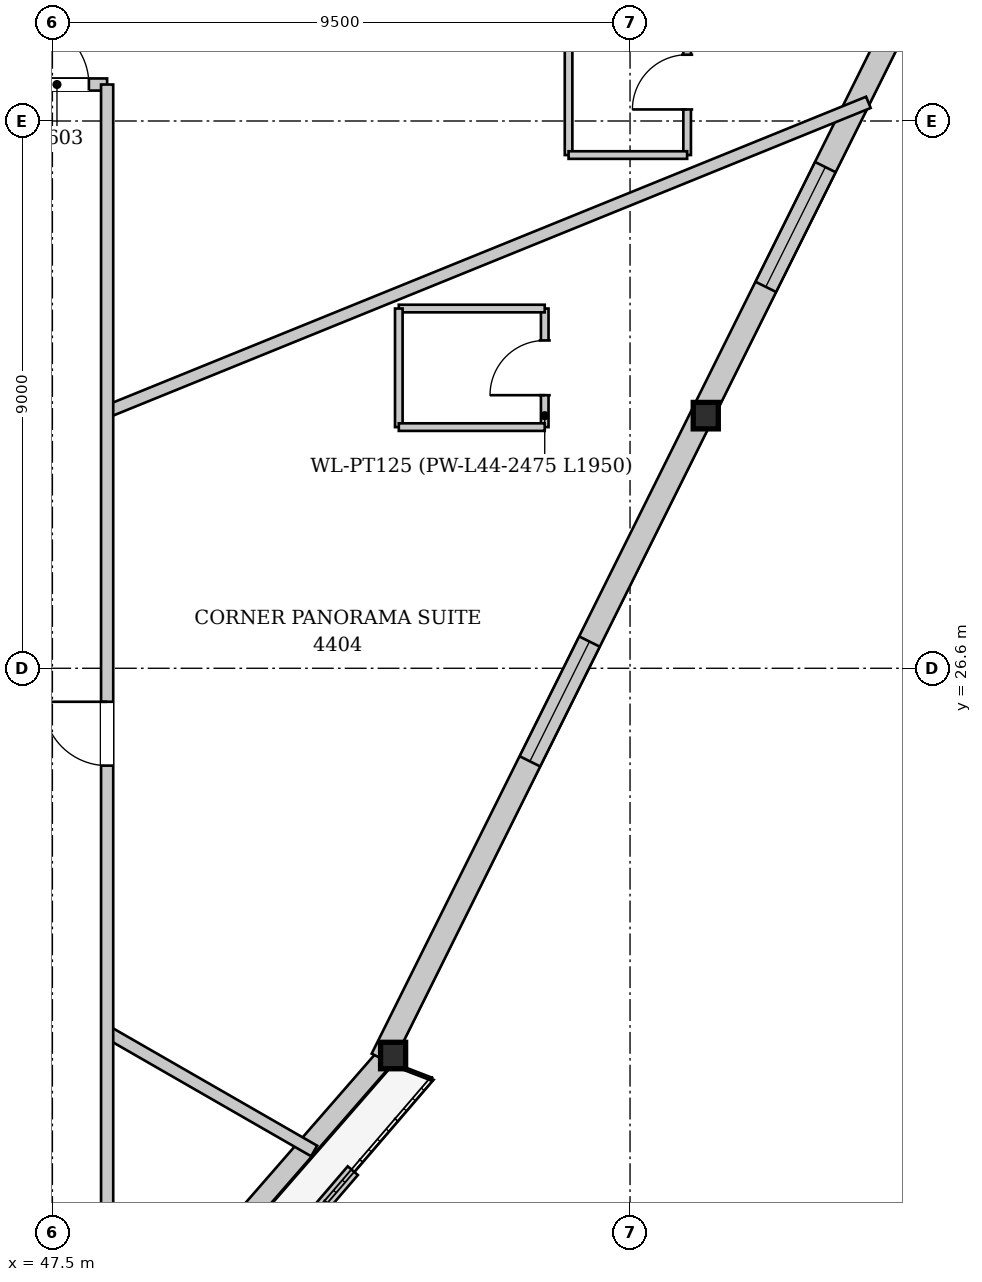
"""IFC4 building model, lengths in metres.
Left out: names, types, materials, properties, quantities, classifications, styles, units other than length and angle.
Written with IfcOpenShell. Run it as: python <this file> out.ifc"""

import sys

from ifc_helpers import new_model, si_unit, direction, frame, frame_2d, origin, origin_2d, place, context, subcontext, project, spatial, rectangle, i_section, extrude, source, transform, mapped, element, fill, save


model = new_model("IFC4")
c1 = context("Model", 3, precision=1e-05, world=origin(), true_north=direction((0.0, 1.0)))
c2 = subcontext(c1, "Body", "Model", "MODEL_VIEW")
j1 = project(units=[si_unit("LENGTHUNIT", "METRE"), si_unit("PLANEANGLEUNIT", "RADIAN")], contexts=[c1])
p1 = place(None, origin())
s1 = spatial("IfcSite", under=j1, at=p1, CompositionType="ELEMENT")
p2 = place(p1, origin())
s2 = spatial("IfcBuilding", under=s1, at=p2, CompositionType="ELEMENT")
p3 = place(p2, frame((0.0, 0.0, 167.9)))
s3 = spatial("IfcBuildingStorey", under=s2, at=p3, CompositionType="ELEMENT", Elevation=167.9)
m1 = source(origin(), c2, "Body", "SweptSolid", [
    extrude(i_section(OverallWidth=0.412, OverallDepth=0.435, WebThickness=0.031, FlangeThickness=0.05, at=origin_2d()), origin(), (0.0, 0.0, 1.0), 3.396),
])
p4 = place(p3, frame((53.091, 20.093, 0.0), z_axis=(0.00718813238, 0.081657183832, 0.996634554429), x_axis=(-0.996147893688, 0.087689075149, 0.0)))
e1 = element("IfcColumn", 1, at=p4, inside=s3, PredefinedType="COLUMN", context=c2, shape_type="MappedRepresentation", body=[
    mapped(m1, transform((0.0, 0.0, 0.0), x_axis=(1.0, 0.0, 0.0), y_axis=(0.0, 1.0, 0.0), z_axis=(0.0, 0.0, 1.0), scale=1.0)),
])
m2 = source(origin(), c2, "Body", "SweptSolid", [
    extrude(i_section(OverallWidth=0.412, OverallDepth=0.435, WebThickness=0.031, FlangeThickness=0.05, at=origin_2d()), origin(), (0.0, 0.0, 1.0), 3.404),
])
p5 = place(p3, frame((58.309, 30.587, 0.0), z_axis=(-0.037225683015, 0.098120875462, 0.994478025058), x_axis=(-0.934974079161, -0.354716043191, 0.0)))
e2 = element("IfcColumn", 2, at=p5, inside=s3, PredefinedType="COLUMN", context=c2, shape_type="MappedRepresentation", body=[
    mapped(m2, transform((0.0, 0.0, 0.0), x_axis=(1.0, 0.0, 0.0), y_axis=(0.0, 1.0, 0.0), z_axis=(0.0, 0.0, 1.0), scale=1.0)),
])
p6 = place(p3, frame((52.97, 20.198, 0.0), z_axis=(0.0, 0.0, 1.0), x_axis=(-0.656914851648, -0.753964772177, 0.0)))
e3 = element("IfcWall", 3, at=p6, inside=s3, PredefinedType="SOLIDWALL", context=c2, shape_type="SweptSolid", body=[
    extrude(rectangle(XDim=23.44, YDim=0.32, at=frame_2d((11.72, 0.0))), origin(), (0.0, 0.0, 1.0), 2.722),
])
p7 = place(p6, frame((6.751, 0.0, 0.0)))
e4 = element("IfcOpeningElement", 4, at=p7, cuts=e3, PredefinedType="OPENING", context=c2, shape_type="SweptSolid", body=[
    extrude(rectangle(XDim=1.5, YDim=2.3, at=frame_2d((0.75, 1.15))), frame((0.0, 0.17, 0.0), z_axis=(0.0, -1.0, 0.0), x_axis=(1.0, 0.0, 0.0)), (0.0, 0.0, 1.0), 0.34),
])
p8 = place(p6, frame((17.646, 0.0, 0.252)))
e5 = element("IfcOpeningElement", 5, at=p8, cuts=e3, PredefinedType="OPENING", context=c2, shape_type="SweptSolid", body=[
    extrude(rectangle(XDim=2.6, YDim=2.35, at=frame_2d((1.3, 1.175))), frame((0.0, 0.17, 0.0), z_axis=(0.0, -1.0, 0.0), x_axis=(1.0, 0.0, 0.0)), (0.0, 0.0, 1.0), 0.34),
])
p9 = place(p3, frame((63.356, 41.167, 0.0), z_axis=(0.0, 0.0, 1.0), x_axis=(-0.44519188478, -0.895435193482, 0.0)))
e6 = element("IfcWall", 6, at=p9, inside=s3, PredefinedType="SOLIDWALL", context=c2, shape_type="SweptSolid", body=[
    extrude(rectangle(XDim=23.441, YDim=0.38, at=frame_2d((11.72, 0.0))), origin(), (0.0, 0.0, 1.0), 2.722),
])
p10 = place(p9, frame((7.063, 0.0, 0.352)))
e7 = element("IfcOpeningElement", 7, at=p10, cuts=e6, PredefinedType="OPENING", context=c2, shape_type="SweptSolid", body=[
    extrude(rectangle(XDim=2.2, YDim=2.25, at=frame_2d((1.1, 1.125))), frame((0.0, 0.2, 0.0), z_axis=(0.0, -1.0, 0.0), x_axis=(1.0, 0.0, 0.0)), (0.0, 0.0, 1.0), 0.4),
])
p11 = place(p9, frame((15.777, 0.0, 0.352)))
e8 = element("IfcOpeningElement", 8, at=p11, cuts=e6, PredefinedType="OPENING", context=c2, shape_type="SweptSolid", body=[
    extrude(rectangle(XDim=2.2, YDim=2.25, at=frame_2d((1.1, 1.125))), frame((0.0, 0.2, 0.0), z_axis=(0.0, -1.0, 0.0), x_axis=(1.0, 0.0, 0.0)), (0.0, 0.0, 1.0), 0.4),
])
p12 = place(p3, frame((38.852, 2.514, 0.0), z_axis=(0.0, 0.0, 1.0), x_axis=(0.651493813463, 0.758653946816, 0.0)))
e9 = element("IfcWall", 9, at=p12, inside=s3, PredefinedType="PARAPET", context=c2, shape_type="SweptSolid", body=[
    extrude(rectangle(XDim=20.858, YDim=0.22, at=frame_2d((10.429, 0.0))), origin(), (0.0, 0.0, 1.0), 0.3),
])
p13 = place(p3, frame((48.4, 20.62, 0.0), z_axis=(0.0, 0.0, 1.0), x_axis=(0.866931821356, -0.498426741979, 0.0)))
e10 = element("IfcWall", 10, at=p13, inside=s3, PredefinedType="PARTITIONING", context=c2, shape_type="SweptSolid", body=[
    extrude(rectangle(XDim=3.927, YDim=0.2, at=frame_2d((1.964, 0.0))), origin(), (0.0, 0.0, 1.0), 3.33),
])
p14 = place(p3, frame((48.4, 30.823, 0.0), z_axis=(0.0, 0.0, 1.0), x_axis=(0.926531533204, 0.376217115477, 0.0)))
e11 = element("IfcWall", 11, at=p14, inside=s3, PredefinedType="PARTITIONING", context=c2, shape_type="SweptSolid", body=[
    extrude(rectangle(XDim=13.513, YDim=0.2, at=frame_2d((6.756, 0.0))), origin(), (0.0, 0.0, 1.0), 3.33),
])
p15 = place(p3, frame((55.597, 30.566, 0.0), z_axis=(0.0, 0.0, 1.0), x_axis=(0.0, 1.0, 0.0)))
e12 = element("IfcWall", 12, at=p15, inside=s3, PredefinedType="PARTITIONING", context=c2, shape_type="SweptSolid", body=[
    extrude(rectangle(XDim=1.95, YDim=0.125, at=frame_2d((0.975, 0.0))), origin(), (0.0, 0.0, 1.0), 3.33),
])
p16 = place(p15, frame((0.525, 0.0, 0.0)))
e13 = element("IfcOpeningElement", 13, at=p16, cuts=e12, PredefinedType="OPENING", context=c2, shape_type="SweptSolid", body=[
    extrude(rectangle(XDim=0.9, YDim=2.1, at=frame_2d((0.45, 1.05))), frame((0.0, 0.073, 0.0), z_axis=(0.0, -1.0, 0.0), x_axis=(1.0, 0.0, 0.0)), (0.0, 0.0, 1.0), 0.145),
])
p17 = place(p3, frame((55.597, 32.516, 0.0), z_axis=(0.0, 0.0, 1.0), x_axis=(-1.0, 0.0, 0.0)))
e14 = element("IfcWall", 14, at=p17, inside=s3, PredefinedType="PARTITIONING", context=c2, shape_type="SweptSolid", body=[
    extrude(rectangle(XDim=2.4, YDim=0.125, at=frame_2d((1.2, 0.0))), origin(), (0.0, 0.0, 1.0), 3.33),
])
p18 = place(p3, frame((53.197, 32.516, 0.0), z_axis=(0.0, 0.0, 1.0), x_axis=(0.0, -1.0, 0.0)))
e15 = element("IfcWall", 15, at=p18, inside=s3, PredefinedType="PARTITIONING", context=c2, shape_type="SweptSolid", body=[
    extrude(rectangle(XDim=1.95, YDim=0.125, at=frame_2d((0.975, 0.0))), origin(), (0.0, 0.0, 1.0), 3.33),
])
p19 = place(p3, frame((53.197, 30.566, 0.0), z_axis=(0.0, 0.0, 1.0), x_axis=(1.0, 0.0, 0.0)))
e16 = element("IfcWall", 16, at=p19, inside=s3, PredefinedType="PARTITIONING", context=c2, shape_type="SweptSolid", body=[
    extrude(rectangle(XDim=2.4, YDim=0.125, at=frame_2d((1.2, 0.0))), origin(), (0.0, 0.0, 1.0), 3.33),
])
p20 = place(p3, frame((57.939, 35.04, 0.0), z_axis=(0.0, 0.0, 1.0), x_axis=(0.0, 1.0, 0.0)))
e17 = element("IfcWall", 17, at=p20, inside=s3, PredefinedType="PARTITIONING", context=c2, shape_type="SweptSolid", body=[
    extrude(rectangle(XDim=2.4, YDim=0.125, at=frame_2d((1.2, 0.0))), origin(), (0.0, 0.0, 1.0), 3.33),
])
p21 = place(p20, frame((0.75, 0.0, 0.0)))
e18 = element("IfcOpeningElement", 18, at=p21, cuts=e17, PredefinedType="OPENING", context=c2, shape_type="SweptSolid", body=[
    extrude(rectangle(XDim=0.9, YDim=2.1, at=frame_2d((0.45, 1.05))), frame((0.0, 0.073, 0.0), z_axis=(0.0, -1.0, 0.0), x_axis=(1.0, 0.0, 0.0)), (0.0, 0.0, 1.0), 0.145),
])
p22 = place(p3, frame((55.989, 37.44, 0.0), z_axis=(0.0, 0.0, 1.0), x_axis=(0.0, -1.0, 0.0)))
e19 = element("IfcWall", 19, at=p22, inside=s3, PredefinedType="PARTITIONING", context=c2, shape_type="SweptSolid", body=[
    extrude(rectangle(XDim=2.4, YDim=0.125, at=frame_2d((1.2, 0.0))), origin(), (0.0, 0.0, 1.0), 3.33),
])
p23 = place(p3, frame((55.989, 35.04, 0.0), z_axis=(0.0, 0.0, 1.0), x_axis=(1.0, 0.0, 0.0)))
e20 = element("IfcWall", 20, at=p23, inside=s3, PredefinedType="PARTITIONING", context=c2, shape_type="SweptSolid", body=[
    extrude(rectangle(XDim=1.95, YDim=0.125, at=frame_2d((0.975, 0.0))), origin(), (0.0, 0.0, 1.0), 3.33),
])
p24 = place(p3, frame((43.4, 36.2, 0.0), z_axis=(0.0, 0.0, 1.0), x_axis=(1.0, 0.0, 0.0)))
e21 = element("IfcWall", 21, at=p24, inside=s3, PredefinedType="PARTITIONING", context=c2, shape_type="SweptSolid", body=[
    extrude(rectangle(XDim=5.0, YDim=0.2, at=frame_2d((2.5, 0.0))), origin(), (0.0, 0.0, 1.0), 3.33),
])
p25 = place(p24, frame((3.65, 0.0, 0.0)))
e22 = element("IfcOpeningElement", 22, at=p25, cuts=e21, PredefinedType="OPENING", context=c2, shape_type="SweptSolid", body=[
    extrude(rectangle(XDim=1.05, YDim=2.2, at=frame_2d((0.525, 1.1))), frame((0.0, 0.11, 0.0), z_axis=(0.0, -1.0, 0.0), x_axis=(1.0, 0.0, 0.0)), (0.0, 0.0, 1.0), 0.22),
])
p26 = place(p3, frame((48.4, 17.0, 0.0), z_axis=(0.0, 0.0, 1.0), x_axis=(0.0, 1.0, 0.0)))
e23 = element("IfcWall", 23, at=p26, inside=s3, PredefinedType="PARTITIONING", context=c2, shape_type="SweptSolid", body=[
    extrude(rectangle(XDim=19.2, YDim=0.2, at=frame_2d((9.6, 0.0))), origin(), (0.0, 0.0, 1.0), 3.33),
])
p27 = place(p26, frame((7.999, 0.0, 0.0)))
e24 = element("IfcOpeningElement", 24, at=p27, cuts=e23, PredefinedType="OPENING", context=c2, shape_type="SweptSolid", body=[
    extrude(rectangle(XDim=1.05, YDim=2.2, at=frame_2d((0.525, 1.1))), frame((0.0, 0.11, 0.0), z_axis=(0.0, -1.0, 0.0), x_axis=(1.0, 0.0, 0.0)), (0.0, 0.0, 1.0), 0.22),
])
m3 = source(origin(), c2, "Body", "SweptSolid", [
    extrude(rectangle(XDim=2.2, YDim=2.25, at=frame_2d((1.1, 1.125))), frame((0.0, 0.03, 0.0), z_axis=(0.0, -1.0, 0.0), x_axis=(1.0, 0.0, 0.0)), (0.0, 0.0, 1.0), 0.06),
])
p28 = place(p10, origin())
e25 = element("IfcWindow", 25, at=p28, inside=s3, PartitioningType="SINGLE_PANEL", PredefinedType="WINDOW", context=c2, shape_type="MappedRepresentation", body=[
    mapped(m3, transform((0.0, 0.0, 0.0), x_axis=(1.0, 0.0, 0.0), y_axis=(0.0, 1.0, 0.0), z_axis=(0.0, 0.0, 1.0), scale=1.0)),
])
fill(e7, e25)
p29 = place(p11, origin())
e26 = element("IfcWindow", 26, at=p29, inside=s3, PartitioningType="SINGLE_PANEL", PredefinedType="WINDOW", context=c2, shape_type="MappedRepresentation", body=[
    mapped(m3, transform((0.0, 0.0, 0.0), x_axis=(1.0, 0.0, 0.0), y_axis=(0.0, 1.0, 0.0), z_axis=(0.0, 0.0, 1.0), scale=1.0)),
])
fill(e8, e26)
m4 = source(origin(), c2, "Body", "SweptSolid", [
    extrude(rectangle(XDim=0.9, YDim=2.1, at=frame_2d((0.45, 1.05))), frame((0.0, 0.025, 0.0), z_axis=(0.0, -1.0, 0.0), x_axis=(1.0, 0.0, 0.0)), (0.0, 0.0, 1.0), 0.05),
])
p30 = place(p16, origin())
e27 = element("IfcDoor", 27, at=p30, inside=s3, OperationType="SINGLE_SWING_LEFT", PredefinedType="DOOR", context=c2, shape_type="MappedRepresentation", body=[
    mapped(m4, transform((0.0, 0.0, 0.0), x_axis=(1.0, 0.0, 0.0), y_axis=(0.0, 1.0, 0.0), z_axis=(0.0, 0.0, 1.0), scale=1.0)),
])
fill(e13, e27)
p31 = place(p21, origin())
e28 = element("IfcDoor", 28, at=p31, inside=s3, OperationType="SINGLE_SWING_LEFT", PredefinedType="DOOR", context=c2, shape_type="MappedRepresentation", body=[
    mapped(m4, transform((0.0, 0.0, 0.0), x_axis=(1.0, 0.0, 0.0), y_axis=(0.0, 1.0, 0.0), z_axis=(0.0, 0.0, 1.0), scale=1.0)),
])
fill(e18, e28)
m5 = source(origin(), c2, "Body", "SweptSolid", [
    extrude(rectangle(XDim=1.05, YDim=2.2, at=frame_2d((0.525, 1.1))), frame((0.0, 0.025, 0.0), z_axis=(0.0, -1.0, 0.0), x_axis=(1.0, 0.0, 0.0)), (0.0, 0.0, 1.0), 0.05),
])
p32 = place(p25, origin())
e29 = element("IfcDoor", 29, at=p32, inside=s3, OperationType="SINGLE_SWING_LEFT", PredefinedType="DOOR", context=c2, shape_type="MappedRepresentation", body=[
    mapped(m5, transform((0.0, 0.0, 0.0), x_axis=(1.0, 0.0, 0.0), y_axis=(0.0, 1.0, 0.0), z_axis=(0.0, 0.0, 1.0), scale=1.0)),
])
fill(e22, e29)
p33 = place(p27, origin())
e30 = element("IfcDoor", 30, at=p33, inside=s3, OperationType="SINGLE_SWING_RIGHT", PredefinedType="DOOR", context=c2, shape_type="MappedRepresentation", body=[
    mapped(m5, transform((0.0, 0.0, 0.0), x_axis=(1.0, 0.0, 0.0), y_axis=(0.0, 1.0, 0.0), z_axis=(0.0, 0.0, 1.0), scale=1.0)),
])
fill(e24, e30)
save(model, sys.argv[1])
